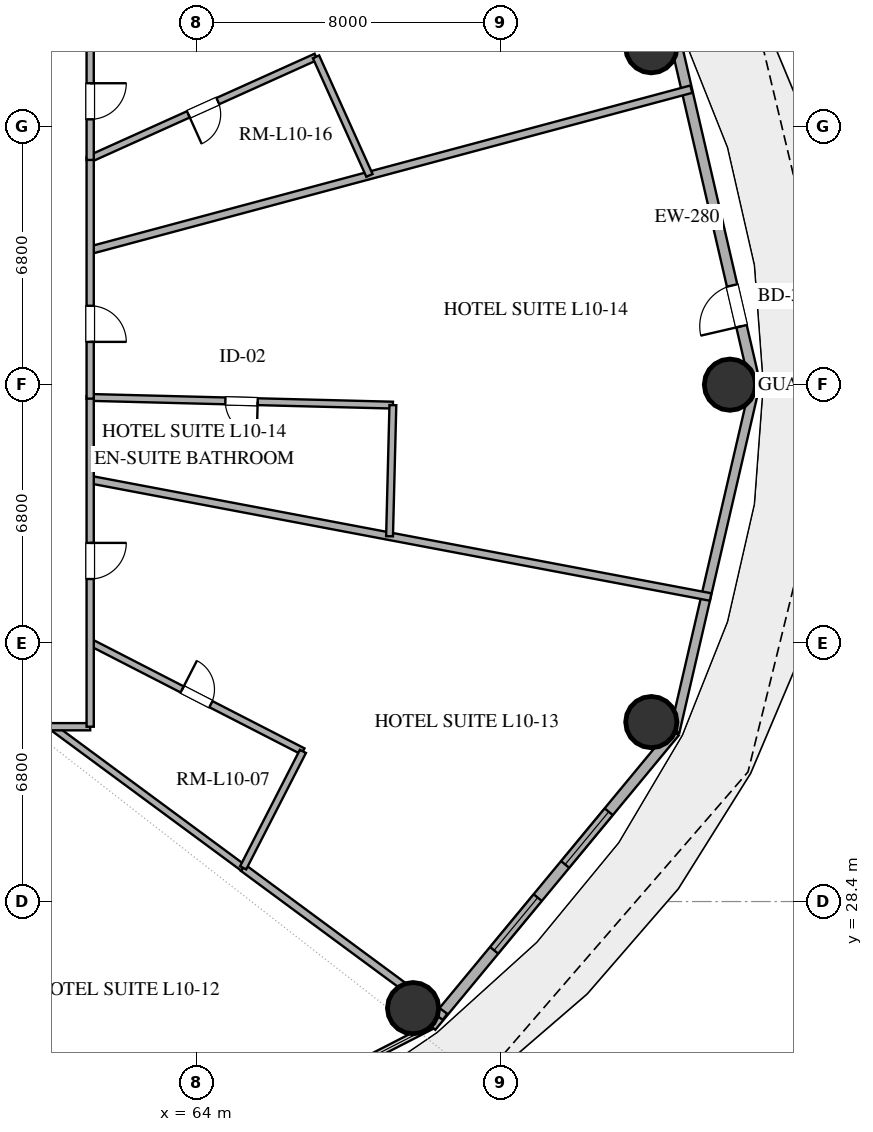
"""IFC4 building model, lengths in metres.
Left out: names, types, materials, properties, quantities, classifications, styles, units other than length and angle.
Written with IfcOpenShell. Run it as: python <this file> out.ifc"""

import sys

from ifc_helpers import new_model, si_unit, direction, frame, frame_2d, origin, origin_2d, place, context, subcontext, project, spatial, rectangle, hollow_circle, extrude, element, fill, save


model = new_model("IFC4")
c1 = context("Model", 3, precision=1e-05, world=origin(), true_north=direction((0.0, 1.0)))
c2 = subcontext(c1, "Body", "Model", "MODEL_VIEW")
j1 = project(units=[si_unit("LENGTHUNIT", "METRE"), si_unit("PLANEANGLEUNIT", "RADIAN")], contexts=[c1])
p1 = place(None, origin())
s1 = spatial("IfcSite", under=j1, at=p1, CompositionType="ELEMENT")
p2 = place(p1, origin())
s2 = spatial("IfcBuilding", under=s1, at=p2, CompositionType="ELEMENT")
p3 = place(p2, frame((0.0, 0.0, 46.2)))
s3 = spatial("IfcBuildingStorey", under=s2, at=p3, CompositionType="ELEMENT", Elevation=46.2)
for number, where, z_axis, x_axis in (
    (1, (78.035, 42.0, 0.0), (0.0, 0.0, 1.0), (1.0, 0.0, 0.0)),
    (2, (75.966, 50.878, 0.0), (0.0, 0.0, 1.0), (1.0, 0.0, 0.0)),
    (3, (69.697, 25.595, 0.0), (0.0, 0.0, 1.0), (1.0, 0.0, 0.0)),
    (4, (75.966, 33.122, 0.0), (0.0, 0.0, 1.0), (1.0, 0.0, 0.0)),
):
    element("IfcColumn", number, at=place(p3, frame(where, z_axis=z_axis, x_axis=x_axis)), inside=s3, PredefinedType="COLUMN", context=c2, shape_type="SweptSolid", body=[
        extrude(hollow_circle(Radius=0.675, WallThickness=0.036, at=origin_2d()), origin(), (0.0, 0.0, 1.0), 3.38),
    ])
p4 = place(p3, frame((78.696, 42.0, 0.0), z_axis=(0.0, 0.0, 1.0), x_axis=(-0.225454452941, 0.974253709076, 0.0)))
e5 = element("IfcWall", 5, at=p4, inside=s3, PredefinedType="SOLIDWALL", context=c2, shape_type="SweptSolid", body=[
    extrude(rectangle(XDim=9.38, YDim=0.28, at=frame_2d((4.69, 0.0))), origin(), (0.0, 0.0, 1.0), 3.38),
])
p5 = place(p4, frame((1.579, 0.0, 0.0)))
e6 = element("IfcOpeningElement", 6, at=p5, cuts=e5, PredefinedType="OPENING", context=c2, shape_type="SweptSolid", body=[
    extrude(rectangle(XDim=1.1, YDim=2.25, at=frame_2d((0.55, 1.125))), frame((0.0, 0.15, 0.0), z_axis=(0.0, -1.0, 0.0), x_axis=(1.0, 0.0, 0.0)), (0.0, 0.0, 1.0), 0.3),
])
p6 = place(p3, frame((70.174, 25.114, 0.0), z_axis=(0.0, 0.0, 1.0), x_axis=(0.637296809613, 0.770618437657, 0.0)))
e7 = element("IfcWall", 7, at=p6, inside=s3, PredefinedType="SOLIDWALL", context=c2, shape_type="SweptSolid", body=[
    extrude(rectangle(XDim=10.053, YDim=0.28, at=frame_2d((5.027, 0.0))), origin(), (0.0, 0.0, 1.0), 3.38),
])
p7 = place(p6, frame((2.598, 0.0, 0.85)))
e8 = element("IfcOpeningElement", 8, at=p7, cuts=e7, PredefinedType="OPENING", context=c2, shape_type="SweptSolid", body=[
    extrude(rectangle(XDim=1.8, YDim=2.2, at=frame_2d((0.9, 1.1))), frame((0.0, 0.15, 0.0), z_axis=(0.0, -1.0, 0.0), x_axis=(1.0, 0.0, 0.0)), (0.0, 0.0, 1.0), 0.3),
])
p8 = place(p6, frame((5.53, 0.0, 0.85)))
e9 = element("IfcOpeningElement", 9, at=p8, cuts=e7, PredefinedType="OPENING", context=c2, shape_type="SweptSolid", body=[
    extrude(rectangle(XDim=1.8, YDim=2.2, at=frame_2d((0.9, 1.1))), frame((0.0, 0.15, 0.0), z_axis=(0.0, -1.0, 0.0), x_axis=(1.0, 0.0, 0.0)), (0.0, 0.0, 1.0), 0.3),
])
p9 = place(p3, frame((76.581, 32.862, 0.0), z_axis=(0.0, 0.0, 1.0), x_axis=(0.225454452941, 0.974253709076, 0.0)))
e10 = element("IfcWall", 10, at=p9, inside=s3, PredefinedType="SOLIDWALL", context=c2, shape_type="SweptSolid", body=[
    extrude(rectangle(XDim=9.38, YDim=0.25, at=frame_2d((4.69, 0.0))), origin(), (0.0, 0.0, 1.0), 3.38),
])
p10 = place(p3, frame((61.2, 45.537, 0.0), z_axis=(0.0, 0.0, 1.0), x_axis=(0.965922233104, 0.258832454679, 0.0)))
e11 = element("IfcWall", 11, at=p10, inside=s3, PredefinedType="PARTITIONING", context=c2, shape_type="SweptSolid", body=[
    extrude(rectangle(XDim=16.377, YDim=0.2, at=frame_2d((8.189, 0.0))), origin(), (0.0, 0.0, 1.0), 2.74),
])
p11 = place(p3, frame((61.2, 39.502, 0.0), z_axis=(0.0, 0.0, 1.0), x_axis=(0.982565603173, -0.185916205484, 0.0)))
e12 = element("IfcWall", 12, at=p11, inside=s3, PredefinedType="PARTITIONING", context=c2, shape_type="SweptSolid", body=[
    extrude(rectangle(XDim=16.616, YDim=0.2, at=frame_2d((8.308, 0.0))), origin(), (0.0, 0.0, 1.0), 2.74),
])
p12 = place(p3, frame((69.165, 41.462, 0.0), z_axis=(0.0, 0.0, 1.0), x_axis=(-0.999676564425, 0.025431605115, 0.0)))
e13 = element("IfcWall", 13, at=p12, inside=s3, PredefinedType="PLUMBINGWALL", context=c2, shape_type="SweptSolid", body=[
    extrude(rectangle(XDim=7.968, YDim=0.18, at=frame_2d((3.984, 0.0))), origin(), (0.0, 0.0, 1.0), 2.74),
])
p13 = place(p12, frame((3.559, 0.0, 0.0)))
e14 = element("IfcOpeningElement", 14, at=p13, cuts=e13, PredefinedType="OPENING", context=c2, shape_type="SweptSolid", body=[
    extrude(rectangle(XDim=0.85, YDim=2.1, at=frame_2d((0.425, 1.05))), frame((0.0, 0.1, 0.0), z_axis=(0.0, -1.0, 0.0), x_axis=(1.0, 0.0, 0.0)), (0.0, 0.0, 1.0), 0.2),
])
p14 = place(p3, frame((70.538, 25.366, 0.0), z_axis=(0.0, 0.0, 1.0), x_axis=(-0.804616980297, 0.593794168898, 0.0)))
e15 = element("IfcWall", 15, at=p14, inside=s3, PredefinedType="PARTITIONING", context=c2, shape_type="SweptSolid", body=[
    extrude(rectangle(XDim=6.603, YDim=0.2, at=frame_2d((3.302, 0.0))), origin(), (0.0, 0.0, 1.0), 2.74),
])
p15 = place(p3, frame((67.143, 50.626, 0.0), z_axis=(0.0, 0.0, 1.0), x_axis=(-0.911702033518, -0.410852044025, 0.0)))
e16 = element("IfcWall", 16, at=p15, inside=s3, PredefinedType="PLUMBINGWALL", context=c2, shape_type="SweptSolid", body=[
    extrude(rectangle(XDim=6.519, YDim=0.18, at=frame_2d((3.259, 0.0))), origin(), (0.0, 0.0, 1.0), 2.74),
])
p16 = place(p15, frame((2.834, 0.0, 0.0)))
e17 = element("IfcOpeningElement", 17, at=p16, cuts=e16, PredefinedType="OPENING", context=c2, shape_type="SweptSolid", body=[
    extrude(rectangle(XDim=0.85, YDim=2.1, at=frame_2d((0.425, 1.05))), frame((0.0, 0.1, 0.0), z_axis=(0.0, -1.0, 0.0), x_axis=(1.0, 0.0, 0.0)), (0.0, 0.0, 1.0), 0.2),
])
p17 = place(p3, frame((61.2, 35.224, 0.0), z_axis=(0.0, 0.0, 1.0), x_axis=(0.889651376734, -0.456640370395, 0.0)))
e18 = element("IfcWall", 18, at=p17, inside=s3, PredefinedType="PLUMBINGWALL", context=c2, shape_type="SweptSolid", body=[
    extrude(rectangle(XDim=6.292, YDim=0.18, at=frame_2d((3.146, 0.0))), origin(), (0.0, 0.0, 1.0), 2.74),
])
p18 = place(p17, frame((2.721, 0.0, 0.0)))
e19 = element("IfcOpeningElement", 19, at=p18, cuts=e18, PredefinedType="OPENING", context=c2, shape_type="SweptSolid", body=[
    extrude(rectangle(XDim=0.85, YDim=2.1, at=frame_2d((0.425, 1.05))), frame((0.0, 0.1, 0.0), z_axis=(0.0, -1.0, 0.0), x_axis=(1.0, 0.0, 0.0)), (0.0, 0.0, 1.0), 0.2),
])
p19 = place(p3, frame((65.225, 29.287, 0.0), z_axis=(0.0, 0.0, 1.0), x_axis=(-0.804582519588, 0.593840861825, 0.0)))
e20 = element("IfcWall", 20, at=p19, inside=s3, PredefinedType="PLUMBINGWALL", context=c2, shape_type="SweptSolid", body=[
    extrude(rectangle(XDim=6.252, YDim=0.18, at=frame_2d((3.126, 0.0))), origin(), (0.0, 0.0, 1.0), 2.74),
])
p20 = place(p3, frame((61.2, 33.0, 0.0), z_axis=(0.0, 0.0, 1.0), x_axis=(-1.0, 0.0, 0.0)))
e21 = element("IfcWall", 21, at=p20, inside=s3, PredefinedType="PARTITIONING", context=c2, shape_type="SweptSolid", body=[
    extrude(rectangle(XDim=8.479, YDim=0.19, at=frame_2d((4.24, 0.0))), origin(), (0.0, 0.0, 1.0), 2.74),
])
p21 = place(p20, frame((3.216, 0.0, 0.0)))
e22 = element("IfcOpeningElement", 22, at=p21, cuts=e21, PredefinedType="OPENING", context=c2, shape_type="SweptSolid", body=[
    extrude(rectangle(XDim=0.95, YDim=2.15, at=frame_2d((0.475, 1.075))), frame((0.0, 0.105, 0.0), z_axis=(0.0, -1.0, 0.0), x_axis=(1.0, 0.0, 0.0)), (0.0, 0.0, 1.0), 0.21),
])
p22 = place(p3, frame((61.2, 41.696, 0.0), z_axis=(0.0, 0.0, 1.0), x_axis=(0.0, -1.0, 0.0)))
e23 = element("IfcWall", 23, at=p22, inside=s3, PredefinedType="PARTITIONING", context=c2, shape_type="SweptSolid", body=[
    extrude(rectangle(XDim=8.696, YDim=0.19, at=frame_2d((4.348, 0.0))), origin(), (0.0, 0.0, 1.0), 2.74),
])
p23 = place(p22, frame((3.86, 0.0, 0.0)))
e24 = element("IfcOpeningElement", 24, at=p23, cuts=e23, PredefinedType="OPENING", context=c2, shape_type="SweptSolid", body=[
    extrude(rectangle(XDim=0.95, YDim=2.15, at=frame_2d((0.475, 1.075))), frame((0.0, 0.105, 0.0), z_axis=(0.0, -1.0, 0.0), x_axis=(1.0, 0.0, 0.0)), (0.0, 0.0, 1.0), 0.21),
])
p24 = place(p3, frame((61.2, 47.983, 0.0), z_axis=(0.0, 0.0, 1.0), x_axis=(0.0, -1.0, 0.0)))
e25 = element("IfcWall", 25, at=p24, inside=s3, PredefinedType="PARTITIONING", context=c2, shape_type="SweptSolid", body=[
    extrude(rectangle(XDim=6.351, YDim=0.19, at=frame_2d((3.176, 0.0))), origin(), (0.0, 0.0, 1.0), 2.74),
])
p25 = place(p24, frame((3.907, 0.0, 0.0)))
e26 = element("IfcOpeningElement", 26, at=p25, cuts=e25, PredefinedType="OPENING", context=c2, shape_type="SweptSolid", body=[
    extrude(rectangle(XDim=0.95, YDim=2.15, at=frame_2d((0.475, 1.075))), frame((0.0, 0.105, 0.0), z_axis=(0.0, -1.0, 0.0), x_axis=(1.0, 0.0, 0.0)), (0.0, 0.0, 1.0), 0.21),
])
p26 = place(p3, frame((69.078, 38.012, 0.0), z_axis=(0.0, 0.0, 1.0), x_axis=(0.02539873932, 0.999677399985, 0.0)))
e27 = element("IfcWall", 27, at=p26, inside=s3, PredefinedType="PLUMBINGWALL", context=c2, shape_type="SweptSolid", body=[
    extrude(rectangle(XDim=3.451, YDim=0.18, at=frame_2d((1.726, 0.0))), origin(), (0.0, 0.0, 1.0), 2.74),
])
p27 = place(p3, frame((66.798, 32.351, 0.0), z_axis=(0.0, 0.0, 1.0), x_axis=(-0.456659133546, -0.889641745732, 0.0)))
e28 = element("IfcWall", 28, at=p27, inside=s3, PredefinedType="PLUMBINGWALL", context=c2, shape_type="SweptSolid", body=[
    extrude(rectangle(XDim=3.444, YDim=0.18, at=frame_2d((1.722, 0.0))), origin(), (0.0, 0.0, 1.0), 2.74),
])
p28 = place(p3, frame((68.549, 47.506, 0.0), z_axis=(0.0, 0.0, 1.0), x_axis=(-0.410839223928, 0.911707810695, 0.0)))
e29 = element("IfcWall", 29, at=p28, inside=s3, PredefinedType="PLUMBINGWALL", context=c2, shape_type="SweptSolid", body=[
    extrude(rectangle(XDim=3.422, YDim=0.18, at=frame_2d((1.711, 0.0))), origin(), (0.0, 0.0, 1.0), 2.74),
])
p29 = place(p3, frame((61.2, 51.0, 0.0), z_axis=(0.0, 0.0, 1.0), x_axis=(0.0, -1.0, 0.0)))
e30 = element("IfcWall", 30, at=p29, inside=s3, PredefinedType="PARTITIONING", context=c2, shape_type="SweptSolid", body=[
    extrude(rectangle(XDim=3.087, YDim=0.19, at=frame_2d((1.543, 0.0))), origin(), (0.0, 0.0, 1.0), 2.74),
])
p30 = place(p29, frame((1.069, 0.0, 0.0)))
e31 = element("IfcOpeningElement", 31, at=p30, cuts=e30, PredefinedType="OPENING", context=c2, shape_type="SweptSolid", body=[
    extrude(rectangle(XDim=0.95, YDim=2.15, at=frame_2d((0.475, 1.075))), frame((0.0, 0.105, 0.0), z_axis=(0.0, -1.0, 0.0), x_axis=(1.0, 0.0, 0.0)), (0.0, 0.0, 1.0), 0.21),
])
p31 = place(p5, origin())
e32 = element("IfcDoor", 32, at=p31, inside=s3, OperationType="SINGLE_SWING_LEFT", PredefinedType="DOOR", context=c2, shape_type="SweptSolid", body=[
    extrude(rectangle(XDim=1.1, YDim=2.25, at=frame_2d((0.55, 1.125))), frame((0.0, 0.025, 0.0), z_axis=(0.0, -1.0, 0.0), x_axis=(1.0, 0.0, 0.0)), (0.0, 0.0, 1.0), 0.05),
])
fill(e6, e32)
p32 = place(p7, origin())
e33 = element("IfcWindow", 33, at=p32, inside=s3, PartitioningType="SINGLE_PANEL", PredefinedType="WINDOW", context=c2, shape_type="SweptSolid", body=[
    extrude(rectangle(XDim=1.8, YDim=2.2, at=frame_2d((0.9, 1.1))), frame((0.0, 0.03, 0.0), z_axis=(0.0, -1.0, 0.0), x_axis=(1.0, 0.0, 0.0)), (0.0, 0.0, 1.0), 0.06),
])
fill(e8, e33)
p33 = place(p8, origin())
e34 = element("IfcWindow", 34, at=p33, inside=s3, PartitioningType="SINGLE_PANEL", PredefinedType="WINDOW", context=c2, shape_type="SweptSolid", body=[
    extrude(rectangle(XDim=1.8, YDim=2.2, at=frame_2d((0.9, 1.1))), frame((0.0, 0.03, 0.0), z_axis=(0.0, -1.0, 0.0), x_axis=(1.0, 0.0, 0.0)), (0.0, 0.0, 1.0), 0.06),
])
fill(e9, e34)
p34 = place(p13, origin())
e35 = element("IfcDoor", 35, at=p34, inside=s3, OperationType="SINGLE_SWING_LEFT", PredefinedType="DOOR", context=c2, shape_type="SweptSolid", body=[
    extrude(rectangle(XDim=0.85, YDim=2.1, at=frame_2d((0.425, 1.05))), frame((0.0, 0.025, 0.0), z_axis=(0.0, -1.0, 0.0), x_axis=(1.0, 0.0, 0.0)), (0.0, 0.0, 1.0), 0.05),
])
fill(e14, e35)
p35 = place(p16, origin())
e36 = element("IfcDoor", 36, at=p35, inside=s3, OperationType="SINGLE_SWING_RIGHT", PredefinedType="DOOR", context=c2, shape_type="SweptSolid", body=[
    extrude(rectangle(XDim=0.85, YDim=2.1, at=frame_2d((0.425, 1.05))), frame((0.0, 0.025, 0.0), z_axis=(0.0, -1.0, 0.0), x_axis=(1.0, 0.0, 0.0)), (0.0, 0.0, 1.0), 0.05),
])
fill(e17, e36)
p36 = place(p18, origin())
e37 = element("IfcDoor", 37, at=p36, inside=s3, OperationType="SINGLE_SWING_LEFT", PredefinedType="DOOR", context=c2, shape_type="SweptSolid", body=[
    extrude(rectangle(XDim=0.85, YDim=2.1, at=frame_2d((0.425, 1.05))), frame((0.0, 0.025, 0.0), z_axis=(0.0, -1.0, 0.0), x_axis=(1.0, 0.0, 0.0)), (0.0, 0.0, 1.0), 0.05),
])
fill(e19, e37)
p37 = place(p23, origin())
e38 = element("IfcDoor", 38, at=p37, inside=s3, OperationType="SINGLE_SWING_LEFT", PredefinedType="DOOR", context=c2, shape_type="SweptSolid", body=[
    extrude(rectangle(XDim=0.95, YDim=2.15, at=frame_2d((0.475, 1.075))), frame((0.0, 0.025, 0.0), z_axis=(0.0, -1.0, 0.0), x_axis=(1.0, 0.0, 0.0)), (0.0, 0.0, 1.0), 0.05),
])
fill(e24, e38)
p38 = place(p25, origin())
e39 = element("IfcDoor", 39, at=p38, inside=s3, OperationType="SINGLE_SWING_RIGHT", PredefinedType="DOOR", context=c2, shape_type="SweptSolid", body=[
    extrude(rectangle(XDim=0.95, YDim=2.15, at=frame_2d((0.475, 1.075))), frame((0.0, 0.025, 0.0), z_axis=(0.0, -1.0, 0.0), x_axis=(1.0, 0.0, 0.0)), (0.0, 0.0, 1.0), 0.05),
])
fill(e26, e39)
p39 = place(p30, origin())
e40 = element("IfcDoor", 40, at=p39, inside=s3, OperationType="SINGLE_SWING_LEFT", PredefinedType="DOOR", context=c2, shape_type="SweptSolid", body=[
    extrude(rectangle(XDim=0.95, YDim=2.15, at=frame_2d((0.475, 1.075))), frame((0.0, 0.025, 0.0), z_axis=(0.0, -1.0, 0.0), x_axis=(1.0, 0.0, 0.0)), (0.0, 0.0, 1.0), 0.05),
])
fill(e31, e40)
save(model, sys.argv[1])
